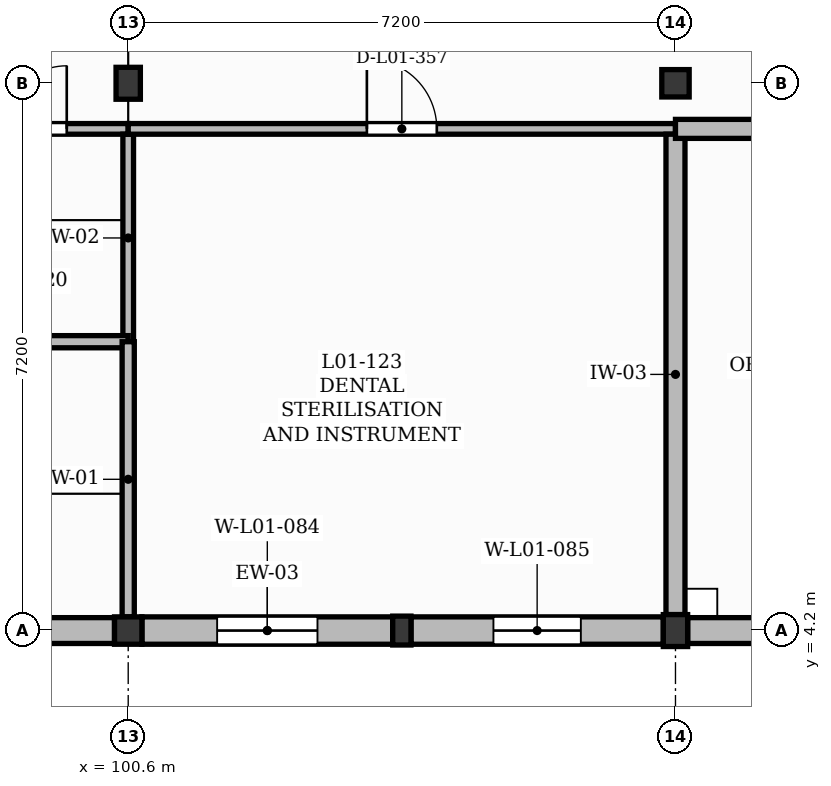
"""IFC4 building model, lengths in metres.
Left out: names, types, materials, properties, quantities, classifications, styles, units other than length and angle.
Written with IfcOpenShell. Run it as: python <this file> out.ifc"""

import sys

from ifc_helpers import new_model, si_unit, direction, frame, frame_2d, origin, origin_2d, place, context, subcontext, project, spatial, rectangle, extrude, element, fill, save


model = new_model("IFC4")
c1 = context("Model", 3, precision=1e-05, world=origin(), true_north=direction((0.0, 1.0)))
c2 = subcontext(c1, "Body", "Model", "MODEL_VIEW")
j1 = project(units=[si_unit("LENGTHUNIT", "METRE"), si_unit("PLANEANGLEUNIT", "RADIAN")], contexts=[c1])
p1 = place(None, origin())
s1 = spatial("IfcSite", under=j1, at=p1, CompositionType="ELEMENT")
p2 = place(p1, origin())
s2 = spatial("IfcBuilding", under=s1, at=p2, CompositionType="ELEMENT")
p3 = place(p2, frame((0.0, 0.0, 4.5)))
s3 = spatial("IfcBuildingStorey", under=s2, at=p3, CompositionType="ELEMENT", Elevation=4.5)
p4 = place(p3, frame((100.6, 4.2, 0.0), z_axis=(0.0, 0.0, 1.0), x_axis=(1.0, 0.0, 0.0)))
e1 = element("IfcColumn", 1, at=p4, inside=s3, PredefinedType="COLUMN", context=c2, shape_type="SweptSolid", body=[
    extrude(rectangle(XDim=0.36, YDim=0.36, at=origin_2d()), origin(), (0.0, 0.0, 1.0), 4.26),
])
for number, where, z_axis, x_axis in (
    (2, (100.6, 11.4, 0.0), (0.0, 0.0, 1.0), (1.0, 0.0, 0.0)),
    (3, (107.8, 4.2, 0.0), (0.0, 0.0, 1.0), (1.0, 0.0, 0.0)),
):
    element("IfcColumn", number, at=place(p3, frame(where, z_axis=z_axis, x_axis=x_axis)), inside=s3, PredefinedType="COLUMN", context=c2, shape_type="SweptSolid", body=[
        extrude(rectangle(XDim=0.32, YDim=0.42, at=origin_2d()), origin(), (0.0, 0.0, 1.0), 4.26),
    ])
p5 = place(p3, frame((107.8, 11.4, 0.0), z_axis=(0.0, 0.0, 1.0), x_axis=(1.0, 0.0, 0.0)))
e4 = element("IfcColumn", 4, at=p5, inside=s3, PredefinedType="COLUMN", context=c2, shape_type="SweptSolid", body=[
    extrude(rectangle(XDim=0.36, YDim=0.36, at=origin_2d()), origin(), (0.0, 0.0, 1.0), 4.26),
])
p6 = place(p3, frame((104.2, 4.2, 0.0), z_axis=(0.0, 0.0, 1.0), x_axis=(1.0, 0.0, 0.0)))
e5 = element("IfcColumn", 5, at=p6, inside=s3, PredefinedType="PILASTER", context=c2, shape_type="SweptSolid", body=[
    extrude(rectangle(XDim=0.24, YDim=0.38, at=origin_2d()), origin(), (0.0, 0.0, 1.0), 4.26),
])
p7 = place(p3, frame((91.16, 4.2, 0.0), z_axis=(0.0, 0.0, 1.0), x_axis=(1.0, 0.0, 0.0)))
e6 = element("IfcWall", 6, at=p7, inside=s3, PredefinedType="SOLIDWALL", context=c2, shape_type="SweptSolid", body=[
    extrude(rectangle(XDim=9.26, YDim=0.34, at=frame_2d((4.63, 0.0))), origin(), (0.0, 0.0, 1.0), 3.8),
])
p8 = place(p3, frame((100.78, 4.2, 0.0), z_axis=(0.0, 0.0, 1.0), x_axis=(1.0, 0.0, 0.0)))
e7 = element("IfcWall", 7, at=p8, inside=s3, PredefinedType="SOLIDWALL", context=c2, shape_type="SweptSolid", body=[
    extrude(rectangle(XDim=3.3, YDim=0.36, at=frame_2d((1.65, 0.0))), origin(), (0.0, 0.0, 1.0), 3.8),
])
p9 = place(p8, frame((0.99, 0.0, 1.5)))
e8 = element("IfcOpeningElement", 8, at=p9, cuts=e7, PredefinedType="OPENING", context=c2, shape_type="SweptSolid", body=[
    extrude(rectangle(XDim=1.32, YDim=1.25, at=frame_2d((0.66, 0.625))), frame((0.0, 0.19, 0.0), z_axis=(0.0, -1.0, 0.0), x_axis=(1.0, 0.0, 0.0)), (0.0, 0.0, 1.0), 0.38),
])
p10 = place(p3, frame((104.32, 4.2, 0.0), z_axis=(0.0, 0.0, 1.0), x_axis=(1.0, 0.0, 0.0)))
e9 = element("IfcWall", 9, at=p10, inside=s3, PredefinedType="SOLIDWALL", context=c2, shape_type="SweptSolid", body=[
    extrude(rectangle(XDim=3.32, YDim=0.36, at=frame_2d((1.66, 0.0))), origin(), (0.0, 0.0, 1.0), 3.8),
])
p11 = place(p10, frame((1.085, 0.0, 1.5)))
e10 = element("IfcOpeningElement", 10, at=p11, cuts=e9, PredefinedType="OPENING", context=c2, shape_type="SweptSolid", body=[
    extrude(rectangle(XDim=1.15, YDim=1.25, at=frame_2d((0.575, 0.625))), frame((0.0, 0.19, 0.0), z_axis=(0.0, -1.0, 0.0), x_axis=(1.0, 0.0, 0.0)), (0.0, 0.0, 1.0), 0.38),
])
p12 = place(p3, frame((107.96, 4.2, 0.0), z_axis=(0.0, 0.0, 1.0), x_axis=(1.0, 0.0, 0.0)))
e11 = element("IfcWall", 11, at=p12, inside=s3, PredefinedType="SOLIDWALL", context=c2, shape_type="SweptSolid", body=[
    extrude(rectangle(XDim=6.79, YDim=0.34, at=frame_2d((3.395, 0.0))), origin(), (0.0, 0.0, 1.0), 3.76),
])
p13 = place(p12, frame((1.42, 0.0, 1.0)))
e12 = element("IfcOpeningElement", 12, at=p13, cuts=e11, PredefinedType="OPENING", context=c2, shape_type="SweptSolid", body=[
    extrude(rectangle(XDim=1.72, YDim=2.2, at=frame_2d((0.86, 1.1))), frame((0.0, 0.18, 0.0), z_axis=(0.0, -1.0, 0.0), x_axis=(1.0, 0.0, 0.0)), (0.0, 0.0, 1.0), 0.36),
])
p14 = place(p3, frame((97.323, 10.8, 0.0), z_axis=(0.0, 0.0, 1.0), x_axis=(1.0, 0.0, 0.0)))
e13 = element("IfcWall", 13, at=p14, inside=s3, PredefinedType="PARTITIONING", context=c2, shape_type="SweptSolid", body=[
    extrude(rectangle(XDim=3.277, YDim=0.14, at=frame_2d((1.639, 0.0))), origin(), (0.0, 0.0, 1.0), 4.18),
])
p15 = place(p14, frame((0.809, 0.0, 0.0)))
e14 = element("IfcOpeningElement", 14, at=p15, cuts=e13, PredefinedType="OPENING", context=c2, shape_type="SweptSolid", body=[
    extrude(rectangle(XDim=1.66, YDim=2.3, at=frame_2d((0.83, 1.15))), frame((0.0, 0.08, 0.0), z_axis=(0.0, -1.0, 0.0), x_axis=(1.0, 0.0, 0.0)), (0.0, 0.0, 1.0), 0.16),
])
p16 = place(p3, frame((100.6, 8.0, 0.0), z_axis=(0.0, 0.0, 1.0), x_axis=(0.0, 1.0, 0.0)))
e15 = element("IfcWall", 15, at=p16, inside=s3, PredefinedType="PARTITIONING", context=c2, shape_type="SweptSolid", body=[
    extrude(rectangle(XDim=2.73, YDim=0.14, at=frame_2d((1.365, 0.0))), origin(), (0.0, 0.0, 1.0), 3.74),
])
p17 = place(p3, frame((100.6, 10.8, 0.0), z_axis=(0.0, 0.0, 1.0), x_axis=(1.0, 0.0, 0.0)))
e16 = element("IfcWall", 16, at=p17, inside=s3, PredefinedType="PARTITIONING", context=c2, shape_type="SweptSolid", body=[
    extrude(rectangle(XDim=7.2, YDim=0.14, at=frame_2d((3.6, 0.0))), origin(), (0.0, 0.0, 1.0), 4.18),
])
p18 = place(p17, frame((3.14, 0.0, 0.0)))
e17 = element("IfcOpeningElement", 17, at=p18, cuts=e16, PredefinedType="OPENING", context=c2, shape_type="SweptSolid", body=[
    extrude(rectangle(XDim=0.92, YDim=2.1, at=frame_2d((0.46, 1.05))), frame((0.0, 0.08, 0.0), z_axis=(0.0, -1.0, 0.0), x_axis=(1.0, 0.0, 0.0)), (0.0, 0.0, 1.0), 0.16),
])
p19 = place(p3, frame((107.8, 4.41, 0.0), z_axis=(0.0, 0.0, 1.0), x_axis=(0.0, 1.0, 0.0)))
e18 = element("IfcWall", 18, at=p19, inside=s3, PredefinedType="SOLIDWALL", context=c2, shape_type="SweptSolid", body=[
    extrude(rectangle(XDim=6.32, YDim=0.25, at=frame_2d((3.16, 0.0))), origin(), (0.0, 0.0, 1.0), 3.74),
])
p20 = place(p3, frame((107.8, 10.8, 0.0), z_axis=(0.0, 0.0, 1.0), x_axis=(1.0, 0.0, 0.0)))
e19 = element("IfcWall", 19, at=p20, inside=s3, PredefinedType="SOLIDWALL", context=c2, shape_type="SweptSolid", body=[
    extrude(rectangle(XDim=4.6, YDim=0.25, at=frame_2d((2.3, 0.0))), origin(), (0.0, 0.0, 1.0), 4.18),
])
p21 = place(p20, frame((1.46, 0.0, 0.0)))
e20 = element("IfcOpeningElement", 20, at=p21, cuts=e19, PredefinedType="OPENING", context=c2, shape_type="SweptSolid", body=[
    extrude(rectangle(XDim=1.68, YDim=2.3, at=frame_2d((0.84, 1.15))), frame((0.0, 0.135, 0.0), z_axis=(0.0, -1.0, 0.0), x_axis=(1.0, 0.0, 0.0)), (0.0, 0.0, 1.0), 0.27),
])
p22 = place(p3, frame((98.55, 8.0, 0.0), z_axis=(0.0, 0.0, 1.0), x_axis=(1.0, 0.0, 0.0)))
e21 = element("IfcWall", 21, at=p22, inside=s3, PredefinedType="PARTITIONING", context=c2, shape_type="SweptSolid", body=[
    extrude(rectangle(XDim=2.05, YDim=0.16, at=frame_2d((1.025, 0.0))), origin(), (0.0, 0.0, 1.0), 4.18),
])
p23 = place(p3, frame((100.6, 4.38, 0.0), z_axis=(0.0, 0.0, 1.0), x_axis=(0.0, 1.0, 0.0)))
e22 = element("IfcWall", 22, at=p23, inside=s3, PredefinedType="PARTITIONING", context=c2, shape_type="SweptSolid", body=[
    extrude(rectangle(XDim=3.62, YDim=0.16, at=frame_2d((1.81, 0.0))), origin(), (0.0, 0.0, 1.0), 3.74),
])
p24 = place(p9, origin())
e23 = element("IfcWindow", 23, at=p24, inside=s3, PartitioningType="SINGLE_PANEL", PredefinedType="WINDOW", context=c2, shape_type="SweptSolid", body=[
    extrude(rectangle(XDim=1.32, YDim=1.25, at=frame_2d((0.66, 0.625))), frame((0.0, 0.03, 0.0), z_axis=(0.0, -1.0, 0.0), x_axis=(1.0, 0.0, 0.0)), (0.0, 0.0, 1.0), 0.06),
])
fill(e8, e23)
p25 = place(p11, origin())
e24 = element("IfcWindow", 24, at=p25, inside=s3, PartitioningType="SINGLE_PANEL", PredefinedType="WINDOW", context=c2, shape_type="SweptSolid", body=[
    extrude(rectangle(XDim=1.15, YDim=1.25, at=frame_2d((0.575, 0.625))), frame((0.0, 0.03, 0.0), z_axis=(0.0, -1.0, 0.0), x_axis=(1.0, 0.0, 0.0)), (0.0, 0.0, 1.0), 0.06),
])
fill(e10, e24)
p26 = place(p15, origin())
e25 = element("IfcDoor", 25, at=p26, inside=s3, OperationType="DOUBLE_DOOR_SINGLE_SWING", PredefinedType="DOOR", context=c2, shape_type="SweptSolid", body=[
    extrude(rectangle(XDim=1.66, YDim=2.3, at=frame_2d((0.83, 1.15))), frame((0.0, 0.025, 0.0), z_axis=(0.0, -1.0, 0.0), x_axis=(1.0, 0.0, 0.0)), (0.0, 0.0, 1.0), 0.05),
])
fill(e14, e25)
p27 = place(p18, origin())
e26 = element("IfcDoor", 26, at=p27, inside=s3, OperationType="SINGLE_SWING_LEFT", PredefinedType="DOOR", context=c2, shape_type="SweptSolid", body=[
    extrude(rectangle(XDim=0.92, YDim=2.1, at=frame_2d((0.46, 1.05))), frame((0.0, 0.025, 0.0), z_axis=(0.0, -1.0, 0.0), x_axis=(1.0, 0.0, 0.0)), (0.0, 0.0, 1.0), 0.05),
])
fill(e17, e26)
save(model, sys.argv[1])
